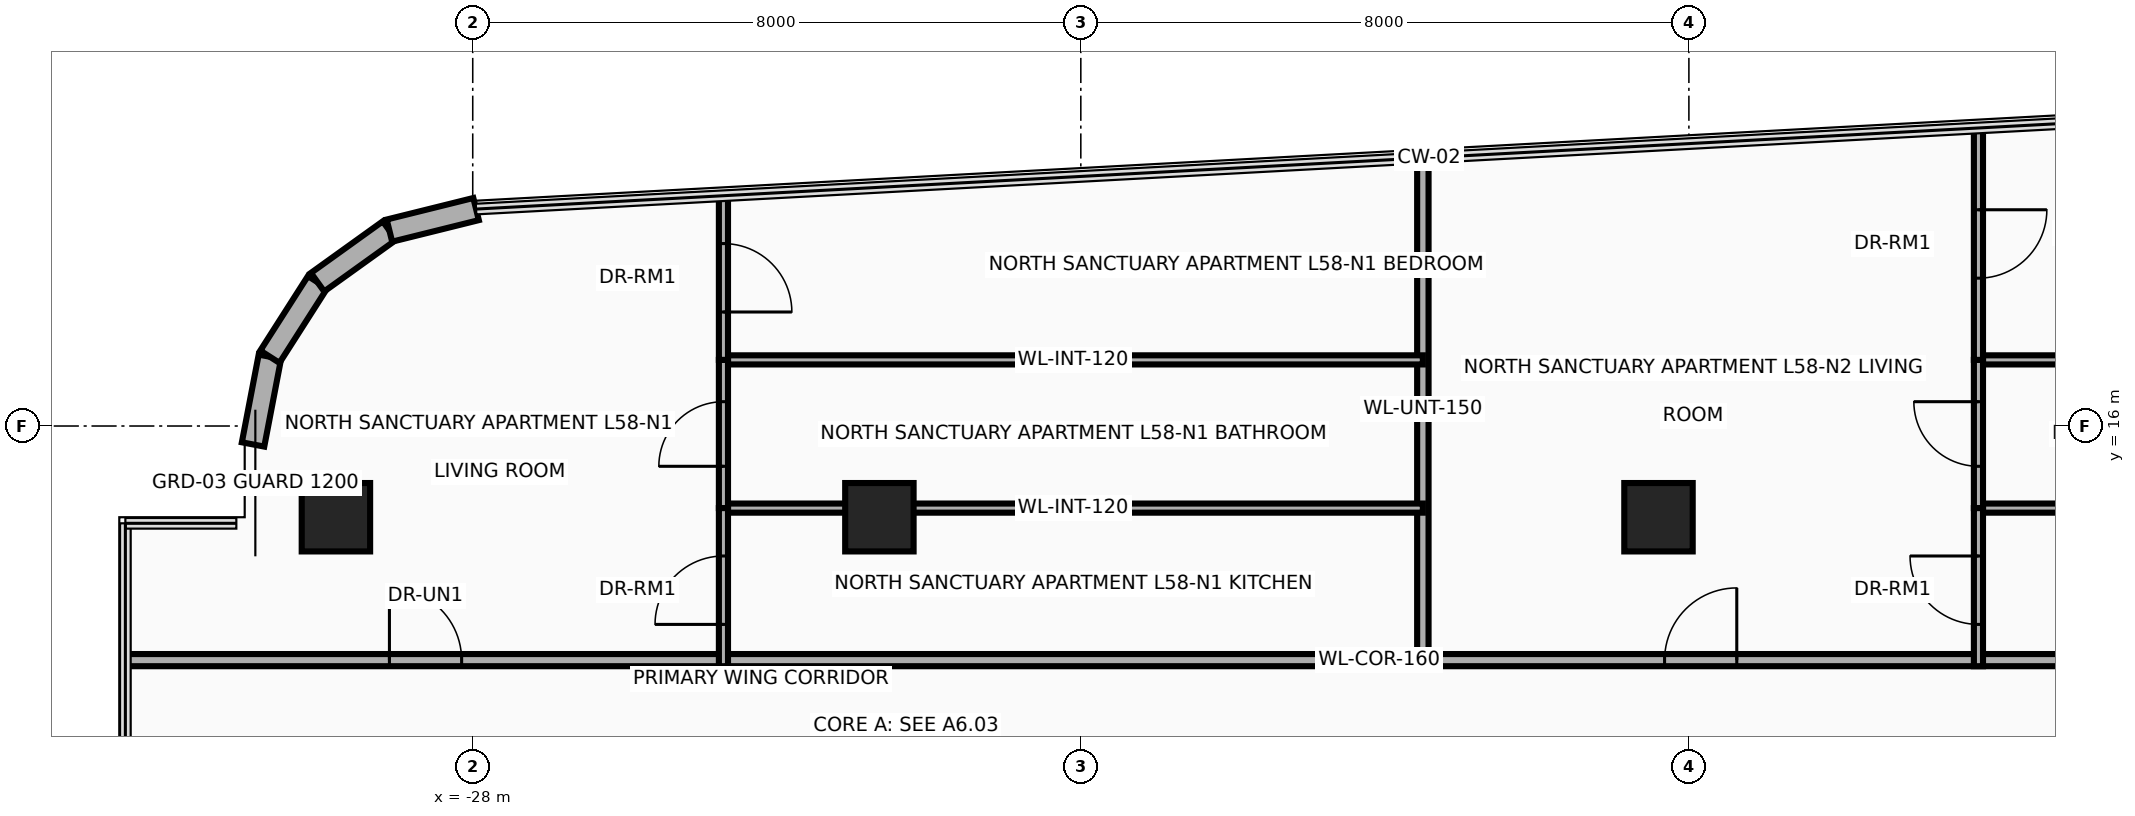
"""IFC4 building model, lengths in metres.
Left out: names, types, materials, properties, quantities, classifications, styles, units other than length and angle.
Written with IfcOpenShell. Run it as: python <this file> out.ifc"""

import sys

from ifc_helpers import new_model, si_unit, direction, frame, frame_2d, origin, origin_2d, place, context, subcontext, project, spatial, rectangle, extrude, source, transform, mapped, element, fill, save


model = new_model("IFC4")
c1 = context("Model", 3, precision=1e-05, world=origin(), true_north=direction((0.0, 1.0)))
c2 = subcontext(c1, "Body", "Model", "MODEL_VIEW")
j1 = project(units=[si_unit("LENGTHUNIT", "METRE"), si_unit("PLANEANGLEUNIT", "RADIAN")], contexts=[c1])
p1 = place(None, origin())
s1 = spatial("IfcSite", under=j1, at=p1, CompositionType="ELEMENT")
p2 = place(p1, origin())
s2 = spatial("IfcBuilding", under=s1, at=p2, CompositionType="ELEMENT")
p3 = place(p2, frame((0.0, 0.0, 226.5)))
s3 = spatial("IfcBuildingStorey", under=s2, at=p3, CompositionType="ELEMENT", Elevation=226.5)
m1 = source(origin(), c2, "Body", "SweptSolid", [
    extrude(rectangle(XDim=0.9, YDim=0.9, at=origin_2d()), origin(), (0.0, 0.0, 1.0), 3.5),
])
for number, where, z_axis, x_axis in (
    (1, (-29.8, 14.8, 0.0), (0.0, 0.0, 1.0), (1.0, 0.0, 0.0)),
    (2, (-22.65, 14.8, 0.0), (0.0, 0.0, 1.0), (1.0, 0.0, 0.0)),
    (3, (-12.4, 14.8, 0.0), (0.0, 0.0, 1.0), (1.0, 0.0, 0.0)),
):
    element("IfcColumn", number, at=place(p3, frame(where, z_axis=z_axis, x_axis=x_axis)), inside=s3, PredefinedType="COLUMN", context=c2, shape_type="MappedRepresentation", body=[
        mapped(m1, transform((0.0, 0.0, 0.0), x_axis=(1.0, 0.0, 0.0), y_axis=(0.0, 1.0, 0.0), z_axis=(0.0, 0.0, 1.0), scale=1.0)),
    ])
p4 = place(p3, frame((-30.89, 15.758, 0.0), z_axis=(0.0, 0.0, 1.0), x_axis=(0.18831542659, 0.982108598938, 0.0)))
e4 = element("IfcWall", 4, at=p4, inside=s3, PredefinedType="SOLIDWALL", context=c2, shape_type="SweptSolid", body=[
    extrude(rectangle(XDim=1.175, YDim=0.3, at=frame_2d((0.587, 0.0))), origin(), (0.0, 0.0, 1.0), 3.26),
])
p5 = place(p3, frame((-30.669, 16.911, 0.0), z_axis=(0.0, 0.0, 1.0), x_axis=(0.538678781902, 0.84251122837, 0.0)))
e5 = element("IfcWall", 5, at=p5, inside=s3, PredefinedType="SOLIDWALL", context=c2, shape_type="SweptSolid", body=[
    extrude(rectangle(XDim=1.164, YDim=0.3, at=frame_2d((0.582, 0.0))), origin(), (0.0, 0.0, 1.0), 3.26),
])
p6 = place(p3, frame((-30.042, 17.892, 0.0), z_axis=(0.0, 0.0, 1.0), x_axis=(0.812313539683, 0.583220981487, 0.0)))
e6 = element("IfcWall", 6, at=p6, inside=s3, PredefinedType="SOLIDWALL", context=c2, shape_type="SweptSolid", body=[
    extrude(rectangle(XDim=1.164, YDim=0.3, at=frame_2d((0.582, 0.0))), origin(), (0.0, 0.0, 1.0), 3.26),
])
p7 = place(p3, frame((-29.096, 18.571, 0.0), z_axis=(0.0, 0.0, 1.0), x_axis=(0.97050812798, 0.241068400098, 0.0)))
e7 = element("IfcWall", 7, at=p7, inside=s3, PredefinedType="SOLIDWALL", context=c2, shape_type="SweptSolid", body=[
    extrude(rectangle(XDim=1.175, YDim=0.3, at=frame_2d((0.587, 0.0))), origin(), (0.0, 0.0, 1.0), 3.26),
])
p8 = place(p3, frame((-32.54, 12.92, 0.0), z_axis=(0.0, 0.0, 1.0), x_axis=(1.0, 0.0, 0.0)))
e8 = element("IfcWall", 8, at=p8, inside=s3, PredefinedType="PARTITIONING", context=c2, shape_type="SweptSolid", body=[
    extrude(rectangle(XDim=32.93, YDim=0.16, at=frame_2d((16.465, 0.0))), origin(), (0.0, 0.0, 1.0), 2.634),
])
p9 = place(p8, frame((3.444, 0.0, 0.0)))
e9 = element("IfcOpeningElement", 9, at=p9, cuts=e8, PredefinedType="OPENING", context=c2, shape_type="SweptSolid", body=[
    extrude(rectangle(XDim=0.95, YDim=2.15, at=frame_2d((0.475, 1.075))), frame((0.0, 0.095, 0.0), z_axis=(0.0, -1.0, 0.0), x_axis=(1.0, 0.0, 0.0)), (0.0, 0.0, 1.0), 0.19),
])
p10 = place(p8, frame((20.22, 0.0, 0.0)))
e10 = element("IfcOpeningElement", 10, at=p10, cuts=e8, PredefinedType="OPENING", context=c2, shape_type="SweptSolid", body=[
    extrude(rectangle(XDim=0.95, YDim=2.15, at=frame_2d((0.475, 1.075))), frame((0.0, 0.095, 0.0), z_axis=(0.0, -1.0, 0.0), x_axis=(1.0, 0.0, 0.0)), (0.0, 0.0, 1.0), 0.19),
])
p11 = place(p3, frame((-15.5, 12.92, 0.0), z_axis=(0.0, 0.0, 1.0), x_axis=(0.0, 1.0, 0.0)))
e11 = element("IfcWall", 11, at=p11, inside=s3, PredefinedType="PARTITIONING", context=c2, shape_type="SweptSolid", body=[
    extrude(rectangle(XDim=6.606, YDim=0.15, at=frame_2d((3.303, 0.0))), origin(), (0.0, 0.0, 1.0), 2.544),
])
p12 = place(p3, frame((-24.702, 14.92, 0.0), z_axis=(0.0, 0.0, 1.0), x_axis=(1.0, 0.0, 0.0)))
e12 = element("IfcWall", 12, at=p12, inside=s3, PredefinedType="PARTITIONING", context=c2, shape_type="SweptSolid", body=[
    extrude(rectangle(XDim=9.202, YDim=0.12, at=frame_2d((4.601, 0.0))), origin(), (0.0, 0.0, 1.0), 2.544),
])
p13 = place(p3, frame((-24.702, 16.87, 0.0), z_axis=(0.0, 0.0, 1.0), x_axis=(1.0, 0.0, 0.0)))
e13 = element("IfcWall", 13, at=p13, inside=s3, PredefinedType="PARTITIONING", context=c2, shape_type="SweptSolid", body=[
    extrude(rectangle(XDim=9.202, YDim=0.12, at=frame_2d((4.601, 0.0))), origin(), (0.0, 0.0, 1.0), 3.26),
])
p14 = place(p3, frame((-24.702, 14.92, 0.0), z_axis=(0.0, 0.0, 1.0), x_axis=(0.0, 1.0, 0.0)))
e14 = element("IfcWall", 14, at=p14, inside=s3, PredefinedType="PARTITIONING", context=c2, shape_type="SweptSolid", body=[
    extrude(rectangle(XDim=1.95, YDim=0.12, at=frame_2d((0.975, 0.0))), origin(), (0.0, 0.0, 1.0), 2.544),
])
p15 = place(p14, frame((0.55, 0.0, 0.0)))
e15 = element("IfcOpeningElement", 15, at=p15, cuts=e14, PredefinedType="OPENING", context=c2, shape_type="SweptSolid", body=[
    extrude(rectangle(XDim=0.85, YDim=2.1, at=frame_2d((0.425, 1.05))), frame((0.0, 0.075, 0.0), z_axis=(0.0, -1.0, 0.0), x_axis=(1.0, 0.0, 0.0)), (0.0, 0.0, 1.0), 0.15),
])
p16 = place(p3, frame((-24.702, 12.84, 0.0), z_axis=(0.0, 0.0, 1.0), x_axis=(0.0, 1.0, 0.0)))
e16 = element("IfcWall", 16, at=p16, inside=s3, PredefinedType="PARTITIONING", context=c2, shape_type="SweptSolid", body=[
    extrude(rectangle(XDim=2.08, YDim=0.12, at=frame_2d((1.04, 0.0))), origin(), (0.0, 0.0, 1.0), 2.544),
])
p17 = place(p16, frame((0.55, 0.0, 0.0)))
e17 = element("IfcOpeningElement", 17, at=p17, cuts=e16, PredefinedType="OPENING", context=c2, shape_type="SweptSolid", body=[
    extrude(rectangle(XDim=0.9, YDim=2.1, at=frame_2d((0.45, 1.05))), frame((0.0, 0.075, 0.0), z_axis=(0.0, -1.0, 0.0), x_axis=(1.0, 0.0, 0.0)), (0.0, 0.0, 1.0), 0.15),
])
p18 = place(p3, frame((-24.702, 16.87, 0.0), z_axis=(0.0, 0.0, 1.0), x_axis=(0.0, 1.0, 0.0)))
e18 = element("IfcWall", 18, at=p18, inside=s3, PredefinedType="PARTITIONING", context=c2, shape_type="SweptSolid", body=[
    extrude(rectangle(XDim=2.16, YDim=0.12, at=frame_2d((1.08, 0.0))), origin(), (0.0, 0.0, 1.0), 3.26),
])
p19 = place(p18, frame((0.63, 0.0, 0.0)))
e19 = element("IfcOpeningElement", 19, at=p19, cuts=e18, PredefinedType="OPENING", context=c2, shape_type="SweptSolid", body=[
    extrude(rectangle(XDim=0.9, YDim=2.1, at=frame_2d((0.45, 1.05))), frame((0.0, 0.075, 0.0), z_axis=(0.0, -1.0, 0.0), x_axis=(1.0, 0.0, 0.0)), (0.0, 0.0, 1.0), 0.15),
])
p20 = place(p3, frame((-8.191, 14.92, 0.0), z_axis=(0.0, 0.0, 1.0), x_axis=(1.0, 0.0, 0.0)))
e20 = element("IfcWall", 20, at=p20, inside=s3, PredefinedType="PARTITIONING", context=c2, shape_type="SweptSolid", body=[
    extrude(rectangle(XDim=8.581, YDim=0.12, at=frame_2d((4.29, 0.0))), origin(), (0.0, 0.0, 1.0), 2.544),
])
p21 = place(p3, frame((-8.191, 16.87, 0.0), z_axis=(0.0, 0.0, 1.0), x_axis=(1.0, 0.0, 0.0)))
e21 = element("IfcWall", 21, at=p21, inside=s3, PredefinedType="PARTITIONING", context=c2, shape_type="SweptSolid", body=[
    extrude(rectangle(XDim=8.581, YDim=0.12, at=frame_2d((4.29, 0.0))), origin(), (0.0, 0.0, 1.0), 3.26),
])
p22 = place(p3, frame((-8.191, 14.92, 0.0), z_axis=(0.0, 0.0, 1.0), x_axis=(0.0, 1.0, 0.0)))
e22 = element("IfcWall", 22, at=p22, inside=s3, PredefinedType="PARTITIONING", context=c2, shape_type="SweptSolid", body=[
    extrude(rectangle(XDim=1.95, YDim=0.12, at=frame_2d((0.975, 0.0))), origin(), (0.0, 0.0, 1.0), 2.544),
])
p23 = place(p22, frame((0.55, 0.0, 0.0)))
e23 = element("IfcOpeningElement", 23, at=p23, cuts=e22, PredefinedType="OPENING", context=c2, shape_type="SweptSolid", body=[
    extrude(rectangle(XDim=0.85, YDim=2.1, at=frame_2d((0.425, 1.05))), frame((0.0, 0.075, 0.0), z_axis=(0.0, -1.0, 0.0), x_axis=(1.0, 0.0, 0.0)), (0.0, 0.0, 1.0), 0.15),
])
p24 = place(p3, frame((-8.191, 12.84, 0.0), z_axis=(0.0, 0.0, 1.0), x_axis=(0.0, 1.0, 0.0)))
e24 = element("IfcWall", 24, at=p24, inside=s3, PredefinedType="PARTITIONING", context=c2, shape_type="SweptSolid", body=[
    extrude(rectangle(XDim=2.08, YDim=0.12, at=frame_2d((1.04, 0.0))), origin(), (0.0, 0.0, 1.0), 2.544),
])
p25 = place(p24, frame((0.55, 0.0, 0.0)))
e25 = element("IfcOpeningElement", 25, at=p25, cuts=e24, PredefinedType="OPENING", context=c2, shape_type="SweptSolid", body=[
    extrude(rectangle(XDim=0.9, YDim=2.1, at=frame_2d((0.45, 1.05))), frame((0.0, 0.075, 0.0), z_axis=(0.0, -1.0, 0.0), x_axis=(1.0, 0.0, 0.0)), (0.0, 0.0, 1.0), 0.15),
])
p26 = place(p3, frame((-8.191, 16.87, 0.0), z_axis=(0.0, 0.0, 1.0), x_axis=(0.0, 1.0, 0.0)))
e26 = element("IfcWall", 26, at=p26, inside=s3, PredefinedType="PARTITIONING", context=c2, shape_type="SweptSolid", body=[
    extrude(rectangle(XDim=3.051, YDim=0.12, at=frame_2d((1.525, 0.0))), origin(), (0.0, 0.0, 1.0), 3.26),
])
p27 = place(p26, frame((1.075, 0.0, 0.0)))
e27 = element("IfcOpeningElement", 27, at=p27, cuts=e26, PredefinedType="OPENING", context=c2, shape_type="SweptSolid", body=[
    extrude(rectangle(XDim=0.9, YDim=2.1, at=frame_2d((0.45, 1.05))), frame((0.0, 0.075, 0.0), z_axis=(0.0, -1.0, 0.0), x_axis=(1.0, 0.0, 0.0)), (0.0, 0.0, 1.0), 0.15),
])
p28 = place(p9, origin())
e28 = element("IfcDoor", 28, at=p28, inside=s3, OperationType="SINGLE_SWING_RIGHT", PredefinedType="DOOR", context=c2, shape_type="SweptSolid", body=[
    extrude(rectangle(XDim=0.95, YDim=2.15, at=frame_2d((0.475, 1.075))), frame((0.0, 0.025, 0.0), z_axis=(0.0, -1.0, 0.0), x_axis=(1.0, 0.0, 0.0)), (0.0, 0.0, 1.0), 0.05),
])
fill(e9, e28)
p29 = place(p15, origin())
e29 = element("IfcDoor", 29, at=p29, inside=s3, OperationType="SINGLE_SWING_LEFT", PredefinedType="DOOR", context=c2, shape_type="SweptSolid", body=[
    extrude(rectangle(XDim=0.85, YDim=2.1, at=frame_2d((0.425, 1.05))), frame((0.0, 0.025, 0.0), z_axis=(0.0, -1.0, 0.0), x_axis=(1.0, 0.0, 0.0)), (0.0, 0.0, 1.0), 0.05),
])
fill(e15, e29)
p30 = place(p17, origin())
e30 = element("IfcDoor", 30, at=p30, inside=s3, OperationType="SINGLE_SWING_RIGHT", PredefinedType="DOOR", context=c2, shape_type="SweptSolid", body=[
    extrude(rectangle(XDim=0.9, YDim=2.1, at=frame_2d((0.45, 1.05))), frame((0.0, 0.025, 0.0), z_axis=(0.0, -1.0, 0.0), x_axis=(1.0, 0.0, 0.0)), (0.0, 0.0, 1.0), 0.05),
])
fill(e17, e30)
p31 = place(p19, frame((0.9, 0.0, 0.0), z_axis=(0.0, 0.0, 1.0), x_axis=(-1.0, 0.0, 0.0)))
e31 = element("IfcDoor", 31, at=p31, inside=s3, OperationType="SINGLE_SWING_LEFT", PredefinedType="DOOR", context=c2, shape_type="SweptSolid", body=[
    extrude(rectangle(XDim=0.9, YDim=2.1, at=frame_2d((0.45, 1.05))), frame((0.0, 0.025, 0.0), z_axis=(0.0, -1.0, 0.0), x_axis=(1.0, 0.0, 0.0)), (0.0, 0.0, 1.0), 0.05),
])
fill(e19, e31)
p32 = place(p10, origin())
e32 = element("IfcDoor", 32, at=p32, inside=s3, OperationType="SINGLE_SWING_RIGHT", PredefinedType="DOOR", context=c2, shape_type="SweptSolid", body=[
    extrude(rectangle(XDim=0.95, YDim=2.15, at=frame_2d((0.475, 1.075))), frame((0.0, 0.025, 0.0), z_axis=(0.0, -1.0, 0.0), x_axis=(1.0, 0.0, 0.0)), (0.0, 0.0, 1.0), 0.05),
])
fill(e10, e32)
p33 = place(p23, origin())
e33 = element("IfcDoor", 33, at=p33, inside=s3, OperationType="SINGLE_SWING_LEFT", PredefinedType="DOOR", context=c2, shape_type="SweptSolid", body=[
    extrude(rectangle(XDim=0.85, YDim=2.1, at=frame_2d((0.425, 1.05))), frame((0.0, 0.025, 0.0), z_axis=(0.0, -1.0, 0.0), x_axis=(1.0, 0.0, 0.0)), (0.0, 0.0, 1.0), 0.05),
])
fill(e23, e33)
p34 = place(p25, origin())
e34 = element("IfcDoor", 34, at=p34, inside=s3, OperationType="SINGLE_SWING_RIGHT", PredefinedType="DOOR", context=c2, shape_type="SweptSolid", body=[
    extrude(rectangle(XDim=0.9, YDim=2.1, at=frame_2d((0.45, 1.05))), frame((0.0, 0.025, 0.0), z_axis=(0.0, -1.0, 0.0), x_axis=(1.0, 0.0, 0.0)), (0.0, 0.0, 1.0), 0.05),
])
fill(e25, e34)
p35 = place(p27, frame((0.9, 0.0, 0.0), z_axis=(0.0, 0.0, 1.0), x_axis=(-1.0, 0.0, 0.0)))
e35 = element("IfcDoor", 35, at=p35, inside=s3, OperationType="SINGLE_SWING_LEFT", PredefinedType="DOOR", context=c2, shape_type="SweptSolid", body=[
    extrude(rectangle(XDim=0.9, YDim=2.1, at=frame_2d((0.45, 1.05))), frame((0.0, 0.025, 0.0), z_axis=(0.0, -1.0, 0.0), x_axis=(1.0, 0.0, 0.0)), (0.0, 0.0, 1.0), 0.05),
])
fill(e27, e35)
save(model, sys.argv[1])
